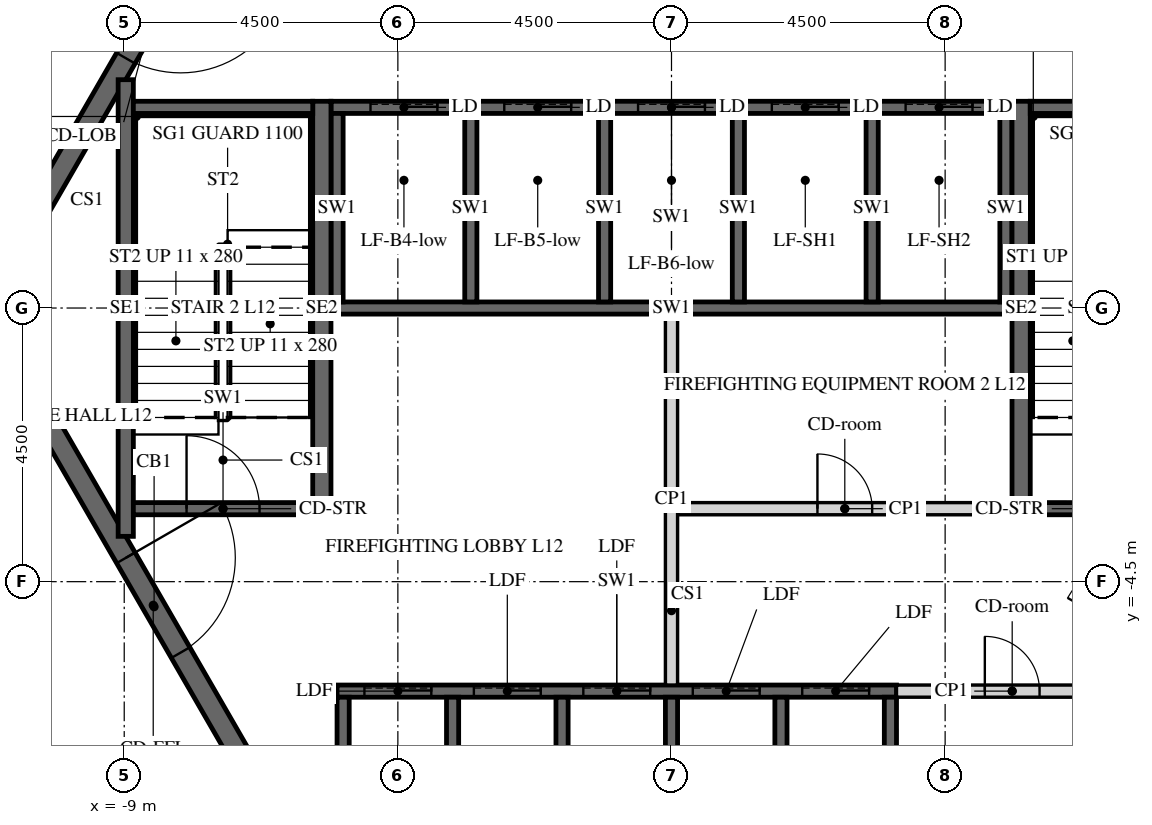
"""IFC4 building model, lengths in metres.
Left out: names, types, materials, properties, quantities, classifications, styles, units other than length and angle.
Written with IfcOpenShell. Run it as: python <this file> out.ifc"""

import sys

from ifc_helpers import new_model, si_unit, direction, frame, frame_2d, origin, place, context, subcontext, project, spatial, polyline, rectangle, outline, extrude, element, fill, save


model = new_model("IFC4")
c1 = context("Model", 3, precision=1e-05, world=origin(), true_north=direction((0.0, 1.0)))
c2 = subcontext(c1, "Body", "Model", "MODEL_VIEW")
j1 = project(units=[si_unit("LENGTHUNIT", "METRE"), si_unit("PLANEANGLEUNIT", "RADIAN")], contexts=[c1])
p1 = place(None, origin())
s1 = spatial("IfcSite", under=j1, at=p1, CompositionType="ELEMENT")
p2 = place(p1, origin())
s2 = spatial("IfcBuilding", under=s1, at=p2, CompositionType="ELEMENT")
p3 = place(p2, frame((0.0, 0.0, 60.9)))
s3 = spatial("IfcBuildingStorey", under=s2, at=p3, CompositionType="ELEMENT", Elevation=60.9)
p4 = place(p3, frame((-7.91, 13.7, -0.15), z_axis=(0.0, 0.0, 1.0), x_axis=(-0.499999880136, -0.866025472988, 0.0)))
e1 = element("IfcWall", 1, at=p4, inside=s3, PredefinedType="SHEAR", context=c2, shape_type="SweptSolid", body=[
    extrude(outline(polyline([(-0.173, -0.3), (15.993, -0.3), (15.646, 0.3), (0.173, 0.3), (-0.173, -0.3)])), origin(), (0.0, 0.0, 1.0), 3.9),
])
p5 = place(p4, frame((7.039, 0.0, 0.15)))
e2 = element("IfcOpeningElement", 2, at=p5, cuts=e1, PredefinedType="OPENING", context=c2, shape_type="SweptSolid", body=[
    extrude(rectangle(XDim=1.8, YDim=2.4, at=frame_2d((0.9, 1.2))), frame((0.0, 0.31, 0.0), z_axis=(0.0, -1.0, 0.0), x_axis=(1.0, 0.0, 0.0)), (0.0, 0.0, 1.0), 0.62),
])
p6 = place(p3, frame((-15.819, 0.0, -0.15), z_axis=(0.0, 0.0, 1.0), x_axis=(0.499999880136, -0.866025472988, 0.0)))
e3 = element("IfcWall", 3, at=p6, inside=s3, PredefinedType="SHEAR", context=c2, shape_type="SweptSolid", body=[
    extrude(outline(polyline([(-0.173, -0.3), (15.993, -0.3), (15.646, 0.3), (0.173, 0.3), (-0.173, -0.3)])), origin(), (0.0, 0.0, 1.0), 3.9),
])
p7 = place(p6, frame((6.981, 0.0, 0.15)))
e4 = element("IfcOpeningElement", 4, at=p7, cuts=e3, PredefinedType="OPENING", context=c2, shape_type="SweptSolid", body=[
    extrude(rectangle(XDim=1.8, YDim=2.4, at=frame_2d((0.9, 1.2))), frame((0.0, 0.31, 0.0), z_axis=(0.0, -1.0, 0.0), x_axis=(1.0, 0.0, 0.0)), (0.0, 0.0, 1.0), 0.62),
])
p8 = place(p3, frame((-5.673, 9.825, -0.15), z_axis=(0.0, 0.0, 1.0), x_axis=(-0.499995046907, -0.866028263435, 0.0)))
e5 = element("IfcWall", 5, at=p8, inside=s3, PredefinedType="SHEAR", context=c2, shape_type="SweptSolid", body=[
    extrude(outline(polyline([(-0.101, -0.175), (11.446, -0.175), (11.244, 0.175), (0.101, 0.175), (-0.101, -0.175)])), origin(), (0.0, 0.0, 1.0), 3.9),
])
p9 = place(p8, frame((4.801, 0.0, 0.15)))
e6 = element("IfcOpeningElement", 6, at=p9, cuts=e5, PredefinedType="OPENING", context=c2, shape_type="SweptSolid", body=[
    extrude(rectangle(XDim=1.8, YDim=2.4, at=frame_2d((0.9, 1.2))), frame((0.0, 0.185, 0.0), z_axis=(0.0, -1.0, 0.0), x_axis=(1.0, 0.0, 0.0)), (0.0, 0.0, 1.0), 0.37),
])
p10 = place(p3, frame((-11.345, 0.0, -0.15), z_axis=(0.0, 0.0, 1.0), x_axis=(0.499995046907, -0.866028263435, 0.0)))
e7 = element("IfcWall", 7, at=p10, inside=s3, PredefinedType="SHEAR", context=c2, shape_type="SweptSolid", body=[
    extrude(outline(polyline([(-0.101, -0.175), (11.446, -0.175), (11.244, 0.175), (0.101, 0.175), (-0.101, -0.175)])), origin(), (0.0, 0.0, 1.0), 3.9),
])
p11 = place(p10, frame((4.744, 0.0, 0.15)))
e8 = element("IfcOpeningElement", 8, at=p11, cuts=e7, PredefinedType="OPENING", context=c2, shape_type="SweptSolid", body=[
    extrude(rectangle(XDim=1.8, YDim=2.4, at=frame_2d((0.9, 1.2))), frame((0.0, 0.185, 0.0), z_axis=(0.0, -1.0, 0.0), x_axis=(1.0, 0.0, 0.0)), (0.0, 0.0, 1.0), 0.37),
])
p12 = place(p3, frame((5.673, -9.825, -0.15), z_axis=(0.0, 0.0, 1.0), x_axis=(0.499995046907, 0.866028263435, 0.0)))
e9 = element("IfcWall", 9, at=p12, inside=s3, PredefinedType="SHEAR", context=c2, shape_type="SweptSolid", body=[
    extrude(outline(polyline([(-0.101, -0.175), (11.446, -0.175), (11.244, 0.175), (0.101, 0.175), (-0.101, -0.175)])), origin(), (0.0, 0.0, 1.0), 3.9),
])
p13 = place(p12, frame((4.801, 0.0, 0.15)))
e10 = element("IfcOpeningElement", 10, at=p13, cuts=e9, PredefinedType="OPENING", context=c2, shape_type="SweptSolid", body=[
    extrude(rectangle(XDim=1.8, YDim=2.4, at=frame_2d((0.9, 1.2))), frame((0.0, 0.185, 0.0), z_axis=(0.0, -1.0, 0.0), x_axis=(1.0, 0.0, 0.0)), (0.0, 0.0, 1.0), 0.37),
])
p14 = place(p3, frame((11.345, 0.0, -0.15), z_axis=(0.0, 0.0, 1.0), x_axis=(-0.499995046907, 0.866028263435, 0.0)))
e11 = element("IfcWall", 11, at=p14, inside=s3, PredefinedType="SHEAR", context=c2, shape_type="SweptSolid", body=[
    extrude(outline(polyline([(-0.101, -0.175), (11.446, -0.175), (11.244, 0.175), (0.101, 0.175), (-0.101, -0.175)])), origin(), (0.0, 0.0, 1.0), 3.9),
])
p15 = place(p14, frame((4.744, 0.0, 0.15)))
e12 = element("IfcOpeningElement", 12, at=p15, cuts=e11, PredefinedType="OPENING", context=c2, shape_type="SweptSolid", body=[
    extrude(rectangle(XDim=1.8, YDim=2.4, at=frame_2d((0.9, 1.2))), frame((0.0, 0.185, 0.0), z_axis=(0.0, -1.0, 0.0), x_axis=(1.0, 0.0, 0.0)), (0.0, 0.0, 1.0), 0.37),
])
p16 = place(p3, frame((-5.6, 3.3, -0.25), z_axis=(0.0, 0.0, 1.0), x_axis=(1.0, 0.0, 0.0)))
e13 = element("IfcWall", 13, at=p16, inside=s3, PredefinedType="SHEAR", context=c2, shape_type="SweptSolid", body=[
    extrude(rectangle(XDim=11.2, YDim=0.2, at=frame_2d((5.6, 0.0))), origin(), (0.0, 0.0, 1.0), 3.9),
])
p17 = place(p16, frame((0.65, 0.0, 0.25)))
e14 = element("IfcOpeningElement", 14, at=p17, cuts=e13, PredefinedType="OPENING", context=c2, shape_type="SweptSolid", body=[
    extrude(rectangle(XDim=1.1, YDim=2.1, at=frame_2d((0.55, 1.05))), frame((0.0, 0.11, 0.0), z_axis=(0.0, -1.0, 0.0), x_axis=(1.0, 0.0, 0.0)), (0.0, 0.0, 1.0), 0.22),
])
p18 = place(p16, frame((2.85, 0.0, 0.25)))
e15 = element("IfcOpeningElement", 15, at=p18, cuts=e13, PredefinedType="OPENING", context=c2, shape_type="SweptSolid", body=[
    extrude(rectangle(XDim=1.1, YDim=2.1, at=frame_2d((0.55, 1.05))), frame((0.0, 0.11, 0.0), z_axis=(0.0, -1.0, 0.0), x_axis=(1.0, 0.0, 0.0)), (0.0, 0.0, 1.0), 0.22),
])
p19 = place(p16, frame((5.05, 0.0, 0.25)))
e16 = element("IfcOpeningElement", 16, at=p19, cuts=e13, PredefinedType="OPENING", context=c2, shape_type="SweptSolid", body=[
    extrude(rectangle(XDim=1.1, YDim=2.1, at=frame_2d((0.55, 1.05))), frame((0.0, 0.11, 0.0), z_axis=(0.0, -1.0, 0.0), x_axis=(1.0, 0.0, 0.0)), (0.0, 0.0, 1.0), 0.22),
])
p20 = place(p16, frame((7.25, 0.0, 0.25)))
e17 = element("IfcOpeningElement", 17, at=p20, cuts=e13, PredefinedType="OPENING", context=c2, shape_type="SweptSolid", body=[
    extrude(rectangle(XDim=1.1, YDim=2.1, at=frame_2d((0.55, 1.05))), frame((0.0, 0.11, 0.0), z_axis=(0.0, -1.0, 0.0), x_axis=(1.0, 0.0, 0.0)), (0.0, 0.0, 1.0), 0.22),
])
p21 = place(p16, frame((9.45, 0.0, 0.25)))
e18 = element("IfcOpeningElement", 18, at=p21, cuts=e13, PredefinedType="OPENING", context=c2, shape_type="SweptSolid", body=[
    extrude(rectangle(XDim=1.1, YDim=2.1, at=frame_2d((0.55, 1.05))), frame((0.0, 0.11, 0.0), z_axis=(0.0, -1.0, 0.0), x_axis=(1.0, 0.0, 0.0)), (0.0, 0.0, 1.0), 0.22),
])
p22 = place(p3, frame((-5.6, 0.0, -0.25), z_axis=(0.0, 0.0, 1.0), x_axis=(1.0, 0.0, 0.0)))
e19 = element("IfcWall", 19, at=p22, inside=s3, PredefinedType="SHEAR", context=c2, shape_type="SweptSolid", body=[
    extrude(rectangle(XDim=11.2, YDim=0.2, at=frame_2d((5.6, 0.0))), origin(), (0.0, 0.0, 1.0), 3.9),
])
for number, where, z_axis, x_axis in (
    (20, (-5.5, 0.1, -0.25), (0.0, 0.0, 1.0), (0.0, 1.0, 0.0)),
    (21, (-3.3, 0.1, -0.25), (0.0, 0.0, 1.0), (0.0, 1.0, 0.0)),
    (22, (-1.1, 0.1, -0.25), (0.0, 0.0, 1.0), (0.0, 1.0, 0.0)),
    (23, (1.1, 0.1, -0.25), (0.0, 0.0, 1.0), (0.0, 1.0, 0.0)),
    (24, (3.3, 0.1, -0.25), (0.0, 0.0, 1.0), (0.0, 1.0, 0.0)),
    (25, (5.5, 0.1, -0.25), (0.0, 0.0, 1.0), (0.0, 1.0, 0.0)),
):
    element("IfcWall", number, at=place(p3, frame(where, z_axis=z_axis, x_axis=x_axis)), inside=s3, PredefinedType="SHEAR", context=c2, shape_type="SweptSolid", body=[
        extrude(rectangle(XDim=3.1, YDim=0.2, at=frame_2d((1.55, 0.0))), origin(), (0.0, 0.0, 1.0), 3.9),
    ])
p23 = place(p3, frame((-5.5, -6.3, -0.25), z_axis=(0.0, 0.0, 1.0), x_axis=(1.0, 0.0, 0.0)))
e26 = element("IfcWall", 26, at=p23, inside=s3, PredefinedType="SHEAR", context=c2, shape_type="SweptSolid", body=[
    extrude(rectangle(XDim=9.2, YDim=0.2, at=frame_2d((4.6, 0.0))), origin(), (0.0, 0.0, 1.0), 3.9),
])
p24 = place(p23, frame((0.45, 0.0, 0.25)))
e27 = element("IfcOpeningElement", 27, at=p24, cuts=e26, PredefinedType="OPENING", context=c2, shape_type="SweptSolid", body=[
    extrude(rectangle(XDim=1.1, YDim=2.1, at=frame_2d((0.55, 1.05))), frame((0.0, 0.11, 0.0), z_axis=(0.0, -1.0, 0.0), x_axis=(1.0, 0.0, 0.0)), (0.0, 0.0, 1.0), 0.22),
])
p25 = place(p23, frame((2.25, 0.0, 0.25)))
e28 = element("IfcOpeningElement", 28, at=p25, cuts=e26, PredefinedType="OPENING", context=c2, shape_type="SweptSolid", body=[
    extrude(rectangle(XDim=1.1, YDim=2.1, at=frame_2d((0.55, 1.05))), frame((0.0, 0.11, 0.0), z_axis=(0.0, -1.0, 0.0), x_axis=(1.0, 0.0, 0.0)), (0.0, 0.0, 1.0), 0.22),
])
p26 = place(p23, frame((4.05, 0.0, 0.25)))
e29 = element("IfcOpeningElement", 29, at=p26, cuts=e26, PredefinedType="OPENING", context=c2, shape_type="SweptSolid", body=[
    extrude(rectangle(XDim=1.1, YDim=2.1, at=frame_2d((0.55, 1.05))), frame((0.0, 0.11, 0.0), z_axis=(0.0, -1.0, 0.0), x_axis=(1.0, 0.0, 0.0)), (0.0, 0.0, 1.0), 0.22),
])
p27 = place(p23, frame((5.85, 0.0, 0.25)))
e30 = element("IfcOpeningElement", 30, at=p27, cuts=e26, PredefinedType="OPENING", context=c2, shape_type="SweptSolid", body=[
    extrude(rectangle(XDim=1.1, YDim=2.1, at=frame_2d((0.55, 1.05))), frame((0.0, 0.11, 0.0), z_axis=(0.0, -1.0, 0.0), x_axis=(1.0, 0.0, 0.0)), (0.0, 0.0, 1.0), 0.22),
])
p28 = place(p23, frame((7.65, 0.0, 0.25)))
e31 = element("IfcOpeningElement", 31, at=p28, cuts=e26, PredefinedType="OPENING", context=c2, shape_type="SweptSolid", body=[
    extrude(rectangle(XDim=1.1, YDim=2.1, at=frame_2d((0.55, 1.05))), frame((0.0, 0.11, 0.0), z_axis=(0.0, -1.0, 0.0), x_axis=(1.0, 0.0, 0.0)), (0.0, 0.0, 1.0), 0.22),
])
for number, where, z_axis, x_axis in (
    (32, (-5.4, -9.3, -0.25), (0.0, 0.0, 1.0), (0.0, 1.0, 0.0)),
    (33, (-3.6, -9.3, -0.25), (0.0, 0.0, 1.0), (0.0, 1.0, 0.0)),
    (34, (-1.8, -9.3, -0.25), (0.0, 0.0, 1.0), (0.0, 1.0, 0.0)),
    (35, (0.0, -9.3, -0.25), (0.0, 0.0, 1.0), (0.0, 1.0, 0.0)),
    (36, (1.8, -9.3, -0.25), (0.0, 0.0, 1.0), (0.0, 1.0, 0.0)),
    (37, (3.6, -9.3, -0.25), (0.0, 0.0, 1.0), (0.0, 1.0, 0.0)),
):
    element("IfcWall", number, at=place(p3, frame(where, z_axis=z_axis, x_axis=x_axis)), inside=s3, PredefinedType="SHEAR", context=c2, shape_type="SweptSolid", body=[
        extrude(rectangle(XDim=2.9, YDim=0.2, at=frame_2d((1.45, 0.0))), origin(), (0.0, 0.0, 1.0), 3.9),
    ])
p29 = place(p3, frame((0.1, -3.3, 0.0), z_axis=(0.0, 0.0, 1.0), x_axis=(1.0, 0.0, 0.0)))
e38 = element("IfcWall", 38, at=p29, inside=s3, PredefinedType="PARTITIONING", context=c2, shape_type="SweptSolid", body=[
    extrude(rectangle(XDim=5.5, YDim=0.2, at=frame_2d((2.75, 0.0))), origin(), (0.0, 0.0, 1.0), 3.65),
])
p30 = place(p29, frame((2.3, 0.0, 0.0)))
e39 = element("IfcOpeningElement", 39, at=p30, cuts=e38, PredefinedType="OPENING", context=c2, shape_type="SweptSolid", body=[
    extrude(rectangle(XDim=0.9, YDim=2.1, at=frame_2d((0.45, 1.05))), frame((0.0, 0.11, 0.0), z_axis=(0.0, -1.0, 0.0), x_axis=(1.0, 0.0, 0.0)), (0.0, 0.0, 1.0), 0.22),
])
p31 = place(p3, frame((0.0, -6.2, 0.0), z_axis=(0.0, 0.0, 1.0), x_axis=(0.0, 1.0, 0.0)))
e40 = element("IfcWall", 40, at=p31, inside=s3, PredefinedType="PARTITIONING", context=c2, shape_type="SweptSolid", body=[
    extrude(rectangle(XDim=6.1, YDim=0.2, at=frame_2d((3.05, 0.0))), origin(), (0.0, 0.0, 1.0), 3.65),
])
p32 = place(p3, frame((3.7, -6.3, 0.0), z_axis=(0.0, 0.0, 1.0), x_axis=(1.0, 0.0, 0.0)))
e41 = element("IfcWall", 41, at=p32, inside=s3, PredefinedType="PARTITIONING", context=c2, shape_type="SweptSolid", body=[
    extrude(rectangle(XDim=3.806, YDim=0.2, at=frame_2d((1.903, 0.0))), origin(), (0.0, 0.0, 1.0), 3.65),
])
p33 = place(p32, frame((1.453, 0.0, 0.0)))
e42 = element("IfcOpeningElement", 42, at=p33, cuts=e41, PredefinedType="OPENING", context=c2, shape_type="SweptSolid", body=[
    extrude(rectangle(XDim=0.9, YDim=2.1, at=frame_2d((0.45, 1.05))), frame((0.0, 0.11, 0.0), z_axis=(0.0, -1.0, 0.0), x_axis=(1.0, 0.0, 0.0)), (0.0, 0.0, 1.0), 0.22),
])
p34 = place(p3, frame((5.75, -3.4, -0.25), z_axis=(0.0, 0.0, 1.0), x_axis=(0.0, 1.0, 0.0)))
e43 = element("IfcWall", 43, at=p34, inside=s3, PredefinedType="SHEAR", context=c2, shape_type="SweptSolid", body=[
    extrude(rectangle(XDim=6.8, YDim=0.3, at=frame_2d((3.4, 0.0))), origin(), (0.0, 0.0, 1.0), 3.9),
])
p35 = place(p3, frame((5.9, 3.3, -0.25), z_axis=(0.0, 0.0, 1.0), x_axis=(1.0, 0.0, 0.0)))
e44 = element("IfcWall", 44, at=p35, inside=s3, PredefinedType="SHEAR", context=c2, shape_type="SweptSolid", body=[
    extrude(rectangle(XDim=2.95, YDim=0.2, at=frame_2d((1.475, 0.0))), origin(), (0.0, 0.0, 1.0), 3.9),
])
p36 = place(p3, frame((5.9, -3.3, -0.25), z_axis=(0.0, 0.0, 1.0), x_axis=(1.0, 0.0, 0.0)))
e45 = element("IfcWall", 45, at=p36, inside=s3, PredefinedType="SHEAR", context=c2, shape_type="SweptSolid", body=[
    extrude(rectangle(XDim=2.95, YDim=0.2, at=frame_2d((1.475, 0.0))), origin(), (0.0, 0.0, 1.0), 3.9),
])
p37 = place(p36, frame((0.875, 0.0, 0.25)))
e46 = element("IfcOpeningElement", 46, at=p37, cuts=e45, PredefinedType="OPENING", context=c2, shape_type="SweptSolid", body=[
    extrude(rectangle(XDim=1.2, YDim=2.4, at=frame_2d((0.6, 1.2))), frame((0.0, 0.11, 0.0), z_axis=(0.0, -1.0, 0.0), x_axis=(1.0, 0.0, 0.0)), (0.0, 0.0, 1.0), 0.22),
])
p38 = place(p3, frame((-5.75, -3.4, -0.25), z_axis=(0.0, 0.0, 1.0), x_axis=(0.0, 1.0, 0.0)))
e47 = element("IfcWall", 47, at=p38, inside=s3, PredefinedType="SHEAR", context=c2, shape_type="SweptSolid", body=[
    extrude(rectangle(XDim=6.8, YDim=0.3, at=frame_2d((3.4, 0.0))), origin(), (0.0, 0.0, 1.0), 3.9),
])
p39 = place(p3, frame((-8.975, -3.755, -0.25), z_axis=(0.0, 0.0, 1.0), x_axis=(0.0, 1.0, 0.0)))
e48 = element("IfcWall", 48, at=p39, inside=s3, PredefinedType="SHEAR", context=c2, shape_type="SweptSolid", body=[
    extrude(rectangle(XDim=7.51, YDim=0.25, at=frame_2d((3.755, 0.0))), origin(), (0.0, 0.0, 1.0), 3.9),
])
p40 = place(p3, frame((-8.85, 3.3, -0.25), z_axis=(0.0, 0.0, 1.0), x_axis=(1.0, 0.0, 0.0)))
e49 = element("IfcWall", 49, at=p40, inside=s3, PredefinedType="SHEAR", context=c2, shape_type="SweptSolid", body=[
    extrude(rectangle(XDim=2.95, YDim=0.2, at=frame_2d((1.475, 0.0))), origin(), (0.0, 0.0, 1.0), 3.9),
])
p41 = place(p3, frame((-8.85, -3.3, -0.25), z_axis=(0.0, 0.0, 1.0), x_axis=(1.0, 0.0, 0.0)))
e50 = element("IfcWall", 50, at=p41, inside=s3, PredefinedType="SHEAR", context=c2, shape_type="SweptSolid", body=[
    extrude(rectangle(XDim=2.95, YDim=0.2, at=frame_2d((1.475, 0.0))), origin(), (0.0, 0.0, 1.0), 3.9),
])
p42 = place(p41, frame((0.875, 0.0, 0.25)))
e51 = element("IfcOpeningElement", 51, at=p42, cuts=e50, PredefinedType="OPENING", context=c2, shape_type="SweptSolid", body=[
    extrude(rectangle(XDim=1.2, YDim=2.4, at=frame_2d((0.6, 1.2))), frame((0.0, 0.11, 0.0), z_axis=(0.0, -1.0, 0.0), x_axis=(1.0, 0.0, 0.0)), (0.0, 0.0, 1.0), 0.22),
])
p43 = place(p9, origin())
e52 = element("IfcDoor", 52, at=p43, inside=s3, OperationType="DOUBLE_DOOR_SINGLE_SWING", PredefinedType="DOOR", context=c2, shape_type="SweptSolid", body=[
    extrude(rectangle(XDim=1.8, YDim=2.4, at=frame_2d((0.9, 1.2))), frame((0.0, 0.025, 0.0), z_axis=(0.0, -1.0, 0.0), x_axis=(1.0, 0.0, 0.0)), (0.0, 0.0, 1.0), 0.05),
])
fill(e6, e52)
p44 = place(p11, origin())
e53 = element("IfcDoor", 53, at=p44, inside=s3, OperationType="DOUBLE_DOOR_SINGLE_SWING", PredefinedType="DOOR", context=c2, shape_type="SweptSolid", body=[
    extrude(rectangle(XDim=1.8, YDim=2.4, at=frame_2d((0.9, 1.2))), frame((0.0, 0.025, 0.0), z_axis=(0.0, -1.0, 0.0), x_axis=(1.0, 0.0, 0.0)), (0.0, 0.0, 1.0), 0.05),
])
fill(e8, e53)
p45 = place(p30, origin())
e54 = element("IfcDoor", 54, at=p45, inside=s3, OperationType="SINGLE_SWING_LEFT", PredefinedType="DOOR", context=c2, shape_type="SweptSolid", body=[
    extrude(rectangle(XDim=0.9, YDim=2.1, at=frame_2d((0.45, 1.05))), frame((0.0, 0.025, 0.0), z_axis=(0.0, -1.0, 0.0), x_axis=(1.0, 0.0, 0.0)), (0.0, 0.0, 1.0), 0.05),
])
fill(e39, e54)
p46 = place(p33, origin())
e55 = element("IfcDoor", 55, at=p46, inside=s3, OperationType="SINGLE_SWING_LEFT", PredefinedType="DOOR", context=c2, shape_type="SweptSolid", body=[
    extrude(rectangle(XDim=0.9, YDim=2.1, at=frame_2d((0.45, 1.05))), frame((0.0, 0.025, 0.0), z_axis=(0.0, -1.0, 0.0), x_axis=(1.0, 0.0, 0.0)), (0.0, 0.0, 1.0), 0.05),
])
fill(e42, e55)
p47 = place(p42, origin())
e56 = element("IfcDoor", 56, at=p47, inside=s3, OperationType="SINGLE_SWING_LEFT", PredefinedType="DOOR", context=c2, shape_type="SweptSolid", body=[
    extrude(rectangle(XDim=1.2, YDim=2.4, at=frame_2d((0.6, 1.2))), frame((0.0, 0.025, 0.0), z_axis=(0.0, -1.0, 0.0), x_axis=(1.0, 0.0, 0.0)), (0.0, 0.0, 1.0), 0.05),
])
fill(e51, e56)
p48 = place(p17, origin())
e57 = element("IfcDoor", 57, at=p48, inside=s3, OperationType="SLIDING_TO_LEFT", PredefinedType="DOOR", context=c2, shape_type="SweptSolid", body=[
    extrude(rectangle(XDim=1.1, YDim=2.1, at=frame_2d((0.55, 1.05))), frame((0.0, 0.025, 0.0), z_axis=(0.0, -1.0, 0.0), x_axis=(1.0, 0.0, 0.0)), (0.0, 0.0, 1.0), 0.05),
])
fill(e14, e57)
p49 = place(p18, origin())
e58 = element("IfcDoor", 58, at=p49, inside=s3, OperationType="SLIDING_TO_LEFT", PredefinedType="DOOR", context=c2, shape_type="SweptSolid", body=[
    extrude(rectangle(XDim=1.1, YDim=2.1, at=frame_2d((0.55, 1.05))), frame((0.0, 0.025, 0.0), z_axis=(0.0, -1.0, 0.0), x_axis=(1.0, 0.0, 0.0)), (0.0, 0.0, 1.0), 0.05),
])
fill(e15, e58)
p50 = place(p19, origin())
e59 = element("IfcDoor", 59, at=p50, inside=s3, OperationType="SLIDING_TO_LEFT", PredefinedType="DOOR", context=c2, shape_type="SweptSolid", body=[
    extrude(rectangle(XDim=1.1, YDim=2.1, at=frame_2d((0.55, 1.05))), frame((0.0, 0.025, 0.0), z_axis=(0.0, -1.0, 0.0), x_axis=(1.0, 0.0, 0.0)), (0.0, 0.0, 1.0), 0.05),
])
fill(e16, e59)
p51 = place(p20, origin())
e60 = element("IfcDoor", 60, at=p51, inside=s3, OperationType="SLIDING_TO_LEFT", PredefinedType="DOOR", context=c2, shape_type="SweptSolid", body=[
    extrude(rectangle(XDim=1.1, YDim=2.1, at=frame_2d((0.55, 1.05))), frame((0.0, 0.025, 0.0), z_axis=(0.0, -1.0, 0.0), x_axis=(1.0, 0.0, 0.0)), (0.0, 0.0, 1.0), 0.05),
])
fill(e17, e60)
p52 = place(p21, origin())
e61 = element("IfcDoor", 61, at=p52, inside=s3, OperationType="SLIDING_TO_LEFT", PredefinedType="DOOR", context=c2, shape_type="SweptSolid", body=[
    extrude(rectangle(XDim=1.1, YDim=2.1, at=frame_2d((0.55, 1.05))), frame((0.0, 0.025, 0.0), z_axis=(0.0, -1.0, 0.0), x_axis=(1.0, 0.0, 0.0)), (0.0, 0.0, 1.0), 0.05),
])
fill(e18, e61)
p53 = place(p24, origin())
e62 = element("IfcDoor", 62, at=p53, inside=s3, OperationType="SLIDING_TO_LEFT", PredefinedType="DOOR", context=c2, shape_type="SweptSolid", body=[
    extrude(rectangle(XDim=1.1, YDim=2.1, at=frame_2d((0.55, 1.05))), frame((0.0, 0.025, 0.0), z_axis=(0.0, -1.0, 0.0), x_axis=(1.0, 0.0, 0.0)), (0.0, 0.0, 1.0), 0.05),
])
fill(e27, e62)
p54 = place(p25, origin())
e63 = element("IfcDoor", 63, at=p54, inside=s3, OperationType="SLIDING_TO_LEFT", PredefinedType="DOOR", context=c2, shape_type="SweptSolid", body=[
    extrude(rectangle(XDim=1.1, YDim=2.1, at=frame_2d((0.55, 1.05))), frame((0.0, 0.025, 0.0), z_axis=(0.0, -1.0, 0.0), x_axis=(1.0, 0.0, 0.0)), (0.0, 0.0, 1.0), 0.05),
])
fill(e28, e63)
p55 = place(p26, origin())
e64 = element("IfcDoor", 64, at=p55, inside=s3, OperationType="SLIDING_TO_LEFT", PredefinedType="DOOR", context=c2, shape_type="SweptSolid", body=[
    extrude(rectangle(XDim=1.1, YDim=2.1, at=frame_2d((0.55, 1.05))), frame((0.0, 0.025, 0.0), z_axis=(0.0, -1.0, 0.0), x_axis=(1.0, 0.0, 0.0)), (0.0, 0.0, 1.0), 0.05),
])
fill(e29, e64)
p56 = place(p27, origin())
e65 = element("IfcDoor", 65, at=p56, inside=s3, OperationType="SLIDING_TO_LEFT", PredefinedType="DOOR", context=c2, shape_type="SweptSolid", body=[
    extrude(rectangle(XDim=1.1, YDim=2.1, at=frame_2d((0.55, 1.05))), frame((0.0, 0.025, 0.0), z_axis=(0.0, -1.0, 0.0), x_axis=(1.0, 0.0, 0.0)), (0.0, 0.0, 1.0), 0.05),
])
fill(e30, e65)
p57 = place(p28, origin())
e66 = element("IfcDoor", 66, at=p57, inside=s3, OperationType="SLIDING_TO_LEFT", PredefinedType="DOOR", context=c2, shape_type="SweptSolid", body=[
    extrude(rectangle(XDim=1.1, YDim=2.1, at=frame_2d((0.55, 1.05))), frame((0.0, 0.025, 0.0), z_axis=(0.0, -1.0, 0.0), x_axis=(1.0, 0.0, 0.0)), (0.0, 0.0, 1.0), 0.05),
])
fill(e31, e66)
save(model, sys.argv[1])
